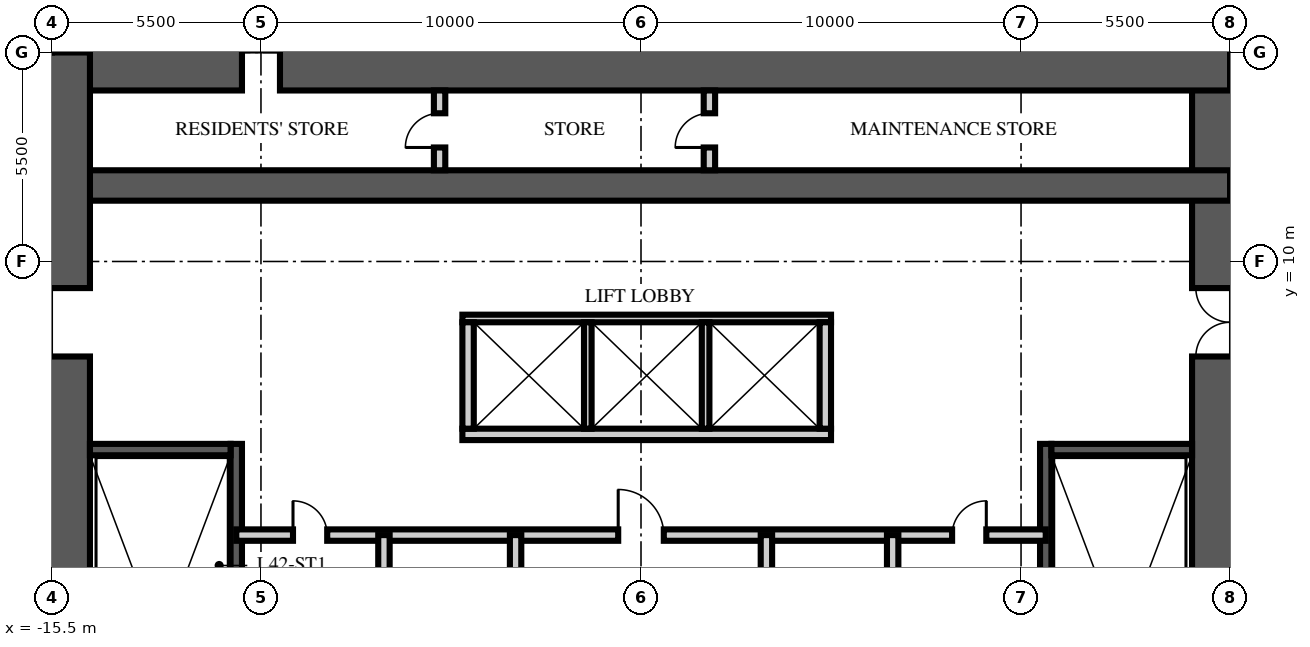
"""IFC4 building model, lengths in metres.
Left out: names, types, materials, properties, quantities, classifications, styles, units other than length and angle.
Written with IfcOpenShell. Run it as: python <this file> out.ifc"""

import sys

from ifc_helpers import new_model, si_unit, direction, frame, frame_2d, origin, place, context, subcontext, project, spatial, rectangle, extrude, element, fill, save


model = new_model("IFC4")
c1 = context("Model", 3, precision=1e-05, world=origin(), true_north=direction((0.0, 1.0)))
c2 = subcontext(c1, "Body", "Model", "MODEL_VIEW")
j1 = project(units=[si_unit("LENGTHUNIT", "METRE"), si_unit("PLANEANGLEUNIT", "RADIAN")], contexts=[c1])
p1 = place(None, origin())
s1 = spatial("IfcSite", under=j1, at=p1, CompositionType="ELEMENT")
p2 = place(p1, origin())
s2 = spatial("IfcBuilding", under=s1, at=p2, CompositionType="ELEMENT")
p3 = place(p2, frame((0.0, 0.0, 167.25)))
s3 = spatial("IfcBuildingStorey", under=s2, at=p3, CompositionType="ELEMENT", Elevation=167.25)
p4 = place(p3, frame((15.5, -15.5, -0.25), z_axis=(0.0, 0.0, 1.0), x_axis=(0.0, 1.0, 0.0)))
e1 = element("IfcWall", 1, at=p4, inside=s3, PredefinedType="SHEAR", context=c2, shape_type="SweptSolid", body=[
    extrude(rectangle(XDim=31.0, YDim=2.0, at=frame_2d((15.5, 0.0))), origin(), (0.0, 0.0, 1.0), 3.75),
])
p5 = place(p4, frame((6.5, 0.0, 0.25)))
e2 = element("IfcOpeningElement", 2, at=p5, cuts=e1, PredefinedType="OPENING", context=c2, shape_type="SweptSolid", body=[
    extrude(rectangle(XDim=1.2, YDim=2.1, at=frame_2d((0.6, 1.05))), frame((0.0, 1.01, 0.0), z_axis=(0.0, -1.0, 0.0), x_axis=(1.0, 0.0, 0.0)), (0.0, 0.0, 1.0), 2.02),
])
p6 = place(p4, frame((23.0, 0.0, 0.25)))
e3 = element("IfcOpeningElement", 3, at=p6, cuts=e1, PredefinedType="OPENING", context=c2, shape_type="SweptSolid", body=[
    extrude(rectangle(XDim=1.8, YDim=2.1, at=frame_2d((0.9, 1.05))), frame((0.0, 1.01, 0.0), z_axis=(0.0, -1.0, 0.0), x_axis=(1.0, 0.0, 0.0)), (0.0, 0.0, 1.0), 2.02),
])
p7 = place(p3, frame((-15.5, 15.5, -0.25), z_axis=(0.0, 0.0, 1.0), x_axis=(1.0, 0.0, 0.0)))
e4 = element("IfcWall", 4, at=p7, inside=s3, PredefinedType="SHEAR", context=c2, shape_type="SweptSolid", body=[
    extrude(rectangle(XDim=31.0, YDim=2.0, at=frame_2d((15.5, 0.0))), origin(), (0.0, 0.0, 1.0), 3.75),
])
p8 = place(p7, frame((5.0, 0.0, 0.25)))
e5 = element("IfcOpeningElement", 5, at=p8, cuts=e4, PredefinedType="OPENING", context=c2, shape_type="SweptSolid", body=[
    extrude(rectangle(XDim=1.0, YDim=2.1, at=frame_2d((0.5, 1.05))), frame((0.0, 1.01, 0.0), z_axis=(0.0, -1.0, 0.0), x_axis=(1.0, 0.0, 0.0)), (0.0, 0.0, 1.0), 2.02),
])
p9 = place(p3, frame((-15.5, 12.0, -0.25), z_axis=(0.0, 0.0, 1.0), x_axis=(1.0, 0.0, 0.0)))
e6 = element("IfcWall", 6, at=p9, inside=s3, PredefinedType="SHEAR", context=c2, shape_type="SweptSolid", body=[
    extrude(rectangle(XDim=31.0, YDim=0.8, at=frame_2d((15.5, 0.0))), origin(), (0.0, 0.0, 1.0), 3.75),
])
p10 = place(p3, frame((-15.5, -15.5, -0.25), z_axis=(0.0, 0.0, 1.0), x_axis=(0.0, 1.0, 0.0)))
e7 = element("IfcWall", 7, at=p10, inside=s3, PredefinedType="SHEAR", context=c2, shape_type="SweptSolid", body=[
    extrude(rectangle(XDim=31.0, YDim=2.0, at=frame_2d((15.5, 0.0))), origin(), (0.0, 0.0, 1.0), 3.75),
])
p11 = place(p10, frame((6.5, 0.0, 0.25)))
e8 = element("IfcOpeningElement", 8, at=p11, cuts=e7, PredefinedType="OPENING", context=c2, shape_type="SweptSolid", body=[
    extrude(rectangle(XDim=1.2, YDim=2.1, at=frame_2d((0.6, 1.05))), frame((0.0, 1.01, 0.0), z_axis=(0.0, -1.0, 0.0), x_axis=(1.0, 0.0, 0.0)), (0.0, 0.0, 1.0), 2.02),
])
p12 = place(p10, frame((23.0, 0.0, 0.25)))
e9 = element("IfcOpeningElement", 9, at=p12, cuts=e7, PredefinedType="OPENING", context=c2, shape_type="SweptSolid", body=[
    extrude(rectangle(XDim=1.8, YDim=2.1, at=frame_2d((0.9, 1.05))), frame((0.0, 1.01, 0.0), z_axis=(0.0, -1.0, 0.0), x_axis=(1.0, 0.0, 0.0)), (0.0, 0.0, 1.0), 2.02),
])
p13 = place(p3, frame((-10.65, -4.9, 0.0), z_axis=(0.0, 0.0, 1.0), x_axis=(0.0, 1.0, 0.0)))
e10 = element("IfcWall", 10, at=p13, inside=s3, PredefinedType="SOLIDWALL", context=c2, shape_type="SweptSolid", body=[
    extrude(rectangle(XDim=10.1, YDim=0.3, at=frame_2d((5.05, 0.0))), origin(), (0.0, 0.0, 1.0), 3.5),
])
p14 = place(p3, frame((-14.5, 5.05, 0.0), z_axis=(0.0, 0.0, 1.0), x_axis=(1.0, 0.0, 0.0)))
e11 = element("IfcWall", 11, at=p14, inside=s3, PredefinedType="SOLIDWALL", context=c2, shape_type="SweptSolid", body=[
    extrude(rectangle(XDim=3.7, YDim=0.3, at=frame_2d((1.85, 0.0))), origin(), (0.0, 0.0, 1.0), 3.5),
])
p15 = place(p3, frame((10.65, -4.9, 0.0), z_axis=(0.0, 0.0, 1.0), x_axis=(0.0, 1.0, 0.0)))
e12 = element("IfcWall", 12, at=p15, inside=s3, PredefinedType="SOLIDWALL", context=c2, shape_type="SweptSolid", body=[
    extrude(rectangle(XDim=10.1, YDim=0.3, at=frame_2d((5.05, 0.0))), origin(), (0.0, 0.0, 1.0), 3.5),
])
p16 = place(p3, frame((14.5, 5.05, 0.0), z_axis=(0.0, 0.0, 1.0), x_axis=(-1.0, 0.0, 0.0)))
e13 = element("IfcWall", 13, at=p16, inside=s3, PredefinedType="SOLIDWALL", context=c2, shape_type="SweptSolid", body=[
    extrude(rectangle(XDim=3.7, YDim=0.3, at=frame_2d((1.85, 0.0))), origin(), (0.0, 0.0, 1.0), 3.5),
])
p17 = place(p3, frame((-4.7, 5.45, 0.0), z_axis=(0.0, 0.0, 1.0), x_axis=(1.0, 0.0, 0.0)))
e14 = element("IfcWall", 14, at=p17, inside=s3, PredefinedType="PARTITIONING", context=c2, shape_type="SweptSolid", body=[
    extrude(rectangle(XDim=9.7, YDim=0.3, at=frame_2d((4.85, 0.0))), origin(), (0.0, 0.0, 1.0), 3.5),
])
p18 = place(p3, frame((-4.7, 8.5, 0.0), z_axis=(0.0, 0.0, 1.0), x_axis=(1.0, 0.0, 0.0)))
e15 = element("IfcWall", 15, at=p18, inside=s3, PredefinedType="PARTITIONING", context=c2, shape_type="SweptSolid", body=[
    extrude(rectangle(XDim=9.7, YDim=0.2, at=frame_2d((4.85, 0.0))), origin(), (0.0, 0.0, 1.0), 3.5),
])
for number, where, z_axis, x_axis in (
    (16, (-4.55, 5.6, 0.0), (0.0, 0.0, 1.0), (0.0, 1.0, 0.0)),
    (17, (4.85, 5.6, 0.0), (0.0, 0.0, 1.0), (0.0, 1.0, 0.0)),
):
    element("IfcWall", number, at=place(p3, frame(where, z_axis=z_axis, x_axis=x_axis)), inside=s3, PredefinedType="PARTITIONING", context=c2, shape_type="SweptSolid", body=[
        extrude(rectangle(XDim=2.8, YDim=0.3, at=frame_2d((1.4, 0.0))), origin(), (0.0, 0.0, 1.0), 3.5),
    ])
for number, where, z_axis, x_axis in (
    (18, (-1.4, 5.6, 0.0), (0.0, 0.0, 1.0), (0.0, 1.0, 0.0)),
    (19, (1.7, 5.6, 0.0), (0.0, 0.0, 1.0), (0.0, 1.0, 0.0)),
):
    element("IfcWall", number, at=place(p3, frame(where, z_axis=z_axis, x_axis=x_axis)), inside=s3, PredefinedType="PARTITIONING", context=c2, shape_type="SweptSolid", body=[
        extrude(rectangle(XDim=2.8, YDim=0.2, at=frame_2d((1.4, 0.0))), origin(), (0.0, 0.0, 1.0), 3.5),
    ])
p19 = place(p3, frame((-10.65, 2.8, 0.0), z_axis=(0.0, 0.0, 1.0), x_axis=(1.0, 0.0, 0.0)))
e20 = element("IfcWall", 20, at=p19, inside=s3, PredefinedType="PARTITIONING", context=c2, shape_type="SweptSolid", body=[
    extrude(rectangle(XDim=21.3, YDim=0.3, at=frame_2d((10.65, 0.0))), origin(), (0.0, 0.0, 1.0), 3.5),
])
p20 = place(p19, frame((10.05, 0.0, 0.0)))
e21 = element("IfcOpeningElement", 21, at=p20, cuts=e20, PredefinedType="OPENING", context=c2, shape_type="SweptSolid", body=[
    extrude(rectangle(XDim=1.2, YDim=2.1, at=frame_2d((0.6, 1.05))), frame((0.0, 0.16, 0.0), z_axis=(0.0, -1.0, 0.0), x_axis=(1.0, 0.0, 0.0)), (0.0, 0.0, 1.0), 0.32),
])
p21 = place(p19, frame((1.493, 0.0, 0.0)))
e22 = element("IfcOpeningElement", 22, at=p21, cuts=e20, PredefinedType="OPENING", context=c2, shape_type="SweptSolid", body=[
    extrude(rectangle(XDim=0.9, YDim=2.1, at=frame_2d((0.45, 1.05))), frame((0.0, 0.16, 0.0), z_axis=(0.0, -1.0, 0.0), x_axis=(1.0, 0.0, 0.0)), (0.0, 0.0, 1.0), 0.32),
])
p22 = place(p19, frame((18.836, 0.0, 0.0)))
e23 = element("IfcOpeningElement", 23, at=p22, cuts=e20, PredefinedType="OPENING", context=c2, shape_type="SweptSolid", body=[
    extrude(rectangle(XDim=0.9, YDim=2.1, at=frame_2d((0.45, 1.05))), frame((0.0, 0.16, 0.0), z_axis=(0.0, -1.0, 0.0), x_axis=(1.0, 0.0, 0.0)), (0.0, 0.0, 1.0), 0.32),
])
p23 = place(p3, frame((-3.3, -6.65, 0.0), z_axis=(0.0, 0.0, 1.0), x_axis=(0.0, 1.0, 0.0)))
e24 = element("IfcWall", 24, at=p23, inside=s3, PredefinedType="PARTITIONING", context=c2, shape_type="SweptSolid", body=[
    extrude(rectangle(XDim=9.45, YDim=0.3, at=frame_2d((4.725, 0.0))), origin(), (0.0, 0.0, 1.0), 3.5),
])
p24 = place(p23, frame((4.275, 0.0, 0.0)))
e25 = element("IfcOpeningElement", 25, at=p24, cuts=e24, PredefinedType="OPENING", context=c2, shape_type="SweptSolid", body=[
    extrude(rectangle(XDim=0.9, YDim=2.1, at=frame_2d((0.45, 1.05))), frame((0.0, 0.16, 0.0), z_axis=(0.0, -1.0, 0.0), x_axis=(1.0, 0.0, 0.0)), (0.0, 0.0, 1.0), 0.32),
])
p25 = place(p3, frame((3.3, -6.65, 0.0), z_axis=(0.0, 0.0, 1.0), x_axis=(0.0, 1.0, 0.0)))
e26 = element("IfcWall", 26, at=p25, inside=s3, PredefinedType="PARTITIONING", context=c2, shape_type="SweptSolid", body=[
    extrude(rectangle(XDim=9.45, YDim=0.3, at=frame_2d((4.725, 0.0))), origin(), (0.0, 0.0, 1.0), 3.5),
])
p26 = place(p25, frame((4.275, 0.0, 0.0)))
e27 = element("IfcOpeningElement", 27, at=p26, cuts=e26, PredefinedType="OPENING", context=c2, shape_type="SweptSolid", body=[
    extrude(rectangle(XDim=0.9, YDim=2.1, at=frame_2d((0.45, 1.05))), frame((0.0, 0.16, 0.0), z_axis=(0.0, -1.0, 0.0), x_axis=(1.0, 0.0, 0.0)), (0.0, 0.0, 1.0), 0.32),
])
for number, where, z_axis, x_axis in (
    (28, (-6.764, -6.65, 0.0), (0.0, 0.0, 1.0), (0.0, 1.0, 0.0)),
    (29, (6.622, -6.65, 0.0), (0.0, 0.0, 1.0), (0.0, 1.0, 0.0)),
):
    element("IfcWall", number, at=place(p3, frame(where, z_axis=z_axis, x_axis=x_axis)), inside=s3, PredefinedType="PARTITIONING", context=c2, shape_type="SweptSolid", body=[
        extrude(rectangle(XDim=9.45, YDim=0.3, at=frame_2d((4.725, 0.0))), origin(), (0.0, 0.0, 1.0), 3.5),
    ])
p27 = place(p3, frame((-5.3, 12.4, 0.0), z_axis=(0.0, 0.0, 1.0), x_axis=(0.0, 1.0, 0.0)))
e30 = element("IfcWall", 30, at=p27, inside=s3, PredefinedType="PARTITIONING", context=c2, shape_type="SweptSolid", body=[
    extrude(rectangle(XDim=2.1, YDim=0.3, at=frame_2d((1.05, 0.0))), origin(), (0.0, 0.0, 1.0), 3.5),
])
p28 = place(p27, frame((0.6, 0.0, 0.0)))
e31 = element("IfcOpeningElement", 31, at=p28, cuts=e30, PredefinedType="OPENING", context=c2, shape_type="SweptSolid", body=[
    extrude(rectangle(XDim=0.9, YDim=2.1, at=frame_2d((0.45, 1.05))), frame((0.0, 0.16, 0.0), z_axis=(0.0, -1.0, 0.0), x_axis=(1.0, 0.0, 0.0)), (0.0, 0.0, 1.0), 0.32),
])
p29 = place(p3, frame((1.8, 12.4, 0.0), z_axis=(0.0, 0.0, 1.0), x_axis=(0.0, 1.0, 0.0)))
e32 = element("IfcWall", 32, at=p29, inside=s3, PredefinedType="PARTITIONING", context=c2, shape_type="SweptSolid", body=[
    extrude(rectangle(XDim=2.1, YDim=0.3, at=frame_2d((1.05, 0.0))), origin(), (0.0, 0.0, 1.0), 3.5),
])
p30 = place(p29, frame((0.6, 0.0, 0.0)))
e33 = element("IfcOpeningElement", 33, at=p30, cuts=e32, PredefinedType="OPENING", context=c2, shape_type="SweptSolid", body=[
    extrude(rectangle(XDim=0.9, YDim=2.1, at=frame_2d((0.45, 1.05))), frame((0.0, 0.16, 0.0), z_axis=(0.0, -1.0, 0.0), x_axis=(1.0, 0.0, 0.0)), (0.0, 0.0, 1.0), 0.32),
])
p31 = place(p12, origin())
e34 = element("IfcDoor", 34, at=p31, inside=s3, OperationType="DOUBLE_DOOR_SINGLE_SWING", PredefinedType="DOOR", context=c2, shape_type="SweptSolid", body=[
    extrude(rectangle(XDim=1.8, YDim=2.1, at=frame_2d((0.9, 1.05))), frame((0.0, 0.025, 0.0), z_axis=(0.0, -1.0, 0.0), x_axis=(1.0, 0.0, 0.0)), (0.0, 0.0, 1.0), 0.05),
])
fill(e9, e34)
p32 = place(p6, origin())
e35 = element("IfcDoor", 35, at=p32, inside=s3, OperationType="DOUBLE_DOOR_SINGLE_SWING", PredefinedType="DOOR", context=c2, shape_type="SweptSolid", body=[
    extrude(rectangle(XDim=1.8, YDim=2.1, at=frame_2d((0.9, 1.05))), frame((0.0, 0.025, 0.0), z_axis=(0.0, -1.0, 0.0), x_axis=(1.0, 0.0, 0.0)), (0.0, 0.0, 1.0), 0.05),
])
fill(e3, e35)
p33 = place(p20, origin())
e36 = element("IfcDoor", 36, at=p33, inside=s3, OperationType="SINGLE_SWING_LEFT", PredefinedType="DOOR", context=c2, shape_type="SweptSolid", body=[
    extrude(rectangle(XDim=1.2, YDim=2.1, at=frame_2d((0.6, 1.05))), frame((0.0, 0.025, 0.0), z_axis=(0.0, -1.0, 0.0), x_axis=(1.0, 0.0, 0.0)), (0.0, 0.0, 1.0), 0.05),
])
fill(e21, e36)
p34 = place(p21, origin())
e37 = element("IfcDoor", 37, at=p34, inside=s3, OperationType="SINGLE_SWING_LEFT", PredefinedType="DOOR", context=c2, shape_type="SweptSolid", body=[
    extrude(rectangle(XDim=0.9, YDim=2.1, at=frame_2d((0.45, 1.05))), frame((0.0, 0.025, 0.0), z_axis=(0.0, -1.0, 0.0), x_axis=(1.0, 0.0, 0.0)), (0.0, 0.0, 1.0), 0.05),
])
fill(e22, e37)
p35 = place(p22, origin())
e38 = element("IfcDoor", 38, at=p35, inside=s3, OperationType="SINGLE_SWING_RIGHT", PredefinedType="DOOR", context=c2, shape_type="SweptSolid", body=[
    extrude(rectangle(XDim=0.9, YDim=2.1, at=frame_2d((0.45, 1.05))), frame((0.0, 0.025, 0.0), z_axis=(0.0, -1.0, 0.0), x_axis=(1.0, 0.0, 0.0)), (0.0, 0.0, 1.0), 0.05),
])
fill(e23, e38)
p36 = place(p28, origin())
e39 = element("IfcDoor", 39, at=p36, inside=s3, OperationType="SINGLE_SWING_LEFT", PredefinedType="DOOR", context=c2, shape_type="SweptSolid", body=[
    extrude(rectangle(XDim=0.9, YDim=2.1, at=frame_2d((0.45, 1.05))), frame((0.0, 0.025, 0.0), z_axis=(0.0, -1.0, 0.0), x_axis=(1.0, 0.0, 0.0)), (0.0, 0.0, 1.0), 0.05),
])
fill(e31, e39)
p37 = place(p30, origin())
e40 = element("IfcDoor", 40, at=p37, inside=s3, OperationType="SINGLE_SWING_LEFT", PredefinedType="DOOR", context=c2, shape_type="SweptSolid", body=[
    extrude(rectangle(XDim=0.9, YDim=2.1, at=frame_2d((0.45, 1.05))), frame((0.0, 0.025, 0.0), z_axis=(0.0, -1.0, 0.0), x_axis=(1.0, 0.0, 0.0)), (0.0, 0.0, 1.0), 0.05),
])
fill(e33, e40)
p38 = place(p8, origin())
e41 = element("IfcDoor", 41, at=p38, inside=s3, OperationType="SINGLE_SWING_RIGHT", PredefinedType="DOOR", context=c2, shape_type="SweptSolid", body=[
    extrude(rectangle(XDim=1.0, YDim=2.1, at=frame_2d((0.5, 1.05))), frame((0.0, 0.025, 0.0), z_axis=(0.0, -1.0, 0.0), x_axis=(1.0, 0.0, 0.0)), (0.0, 0.0, 1.0), 0.05),
])
fill(e5, e41)
save(model, sys.argv[1])
